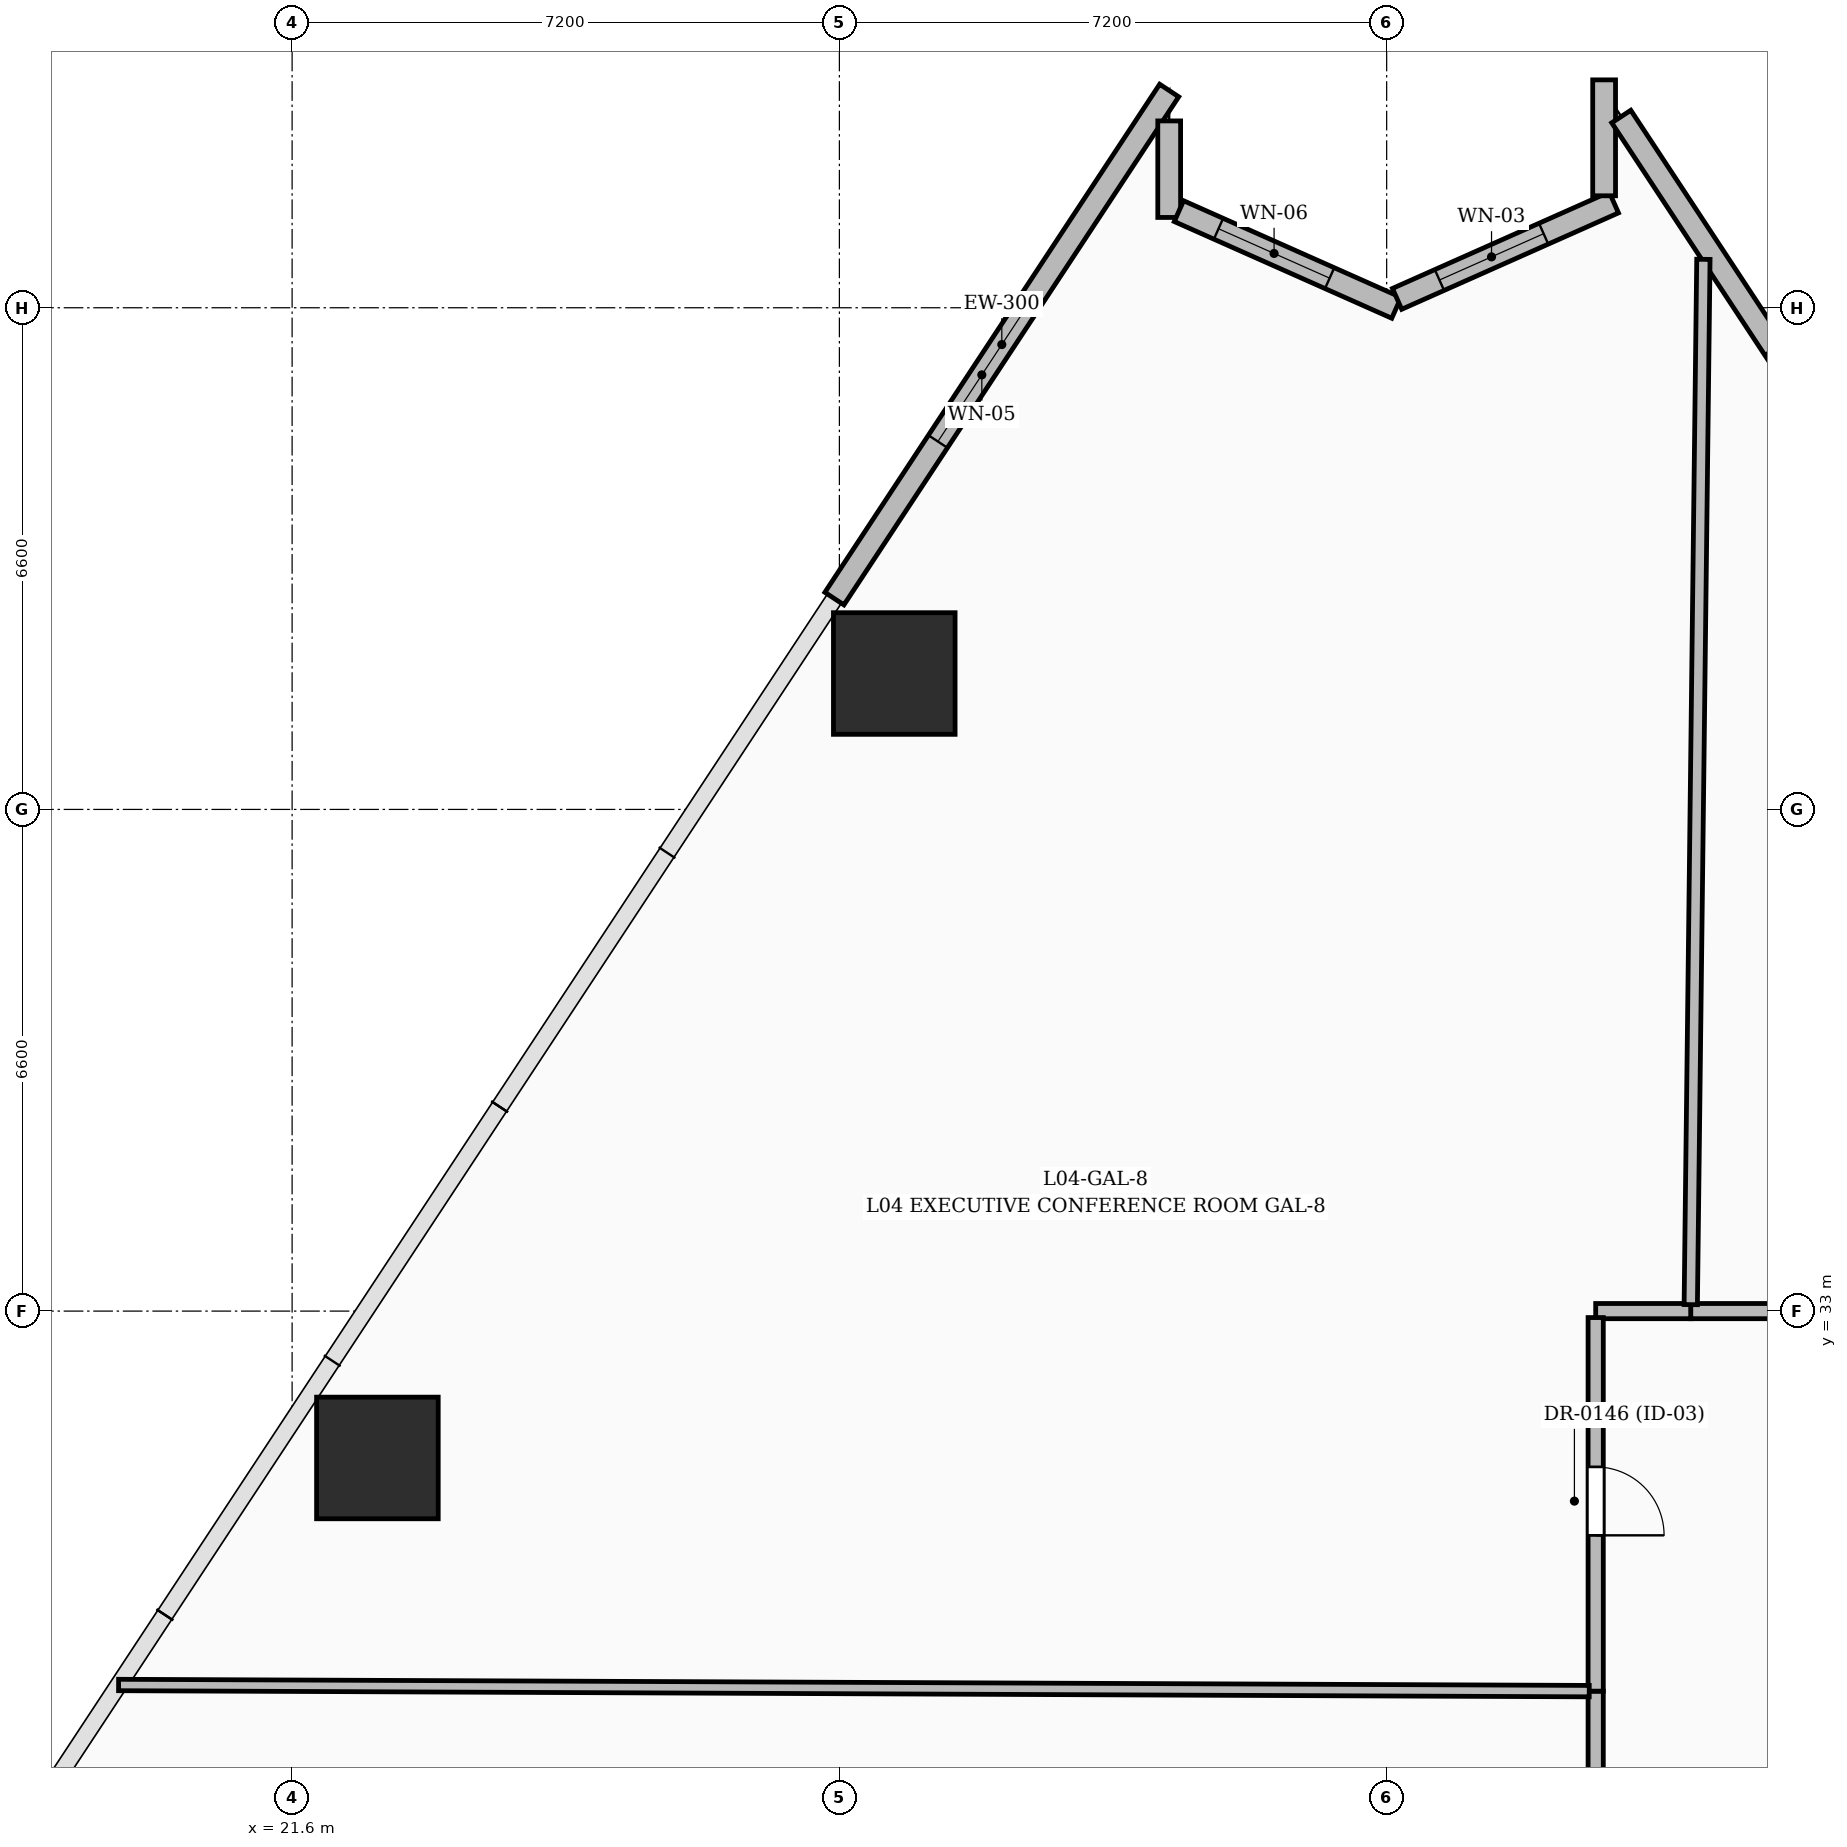
"""IFC4 building model, lengths in metres.
Left out: names, types, materials, properties, quantities, classifications, styles, units other than length and angle.
Written with IfcOpenShell. Run it as: python <this file> out.ifc"""

import sys

from ifc_helpers import new_model, si_unit, direction, frame, frame_2d, origin, origin_2d, place, context, subcontext, project, spatial, rectangle, extrude, element, fill, save


model = new_model("IFC4")
c1 = context("Model", 3, precision=1e-05, world=origin(), true_north=direction((0.0, 1.0)))
c2 = subcontext(c1, "Body", "Model", "MODEL_VIEW")
j1 = project(units=[si_unit("LENGTHUNIT", "METRE"), si_unit("PLANEANGLEUNIT", "RADIAN")], contexts=[c1])
p1 = place(None, origin())
s1 = spatial("IfcSite", under=j1, at=p1, CompositionType="ELEMENT")
p2 = place(p1, origin())
s2 = spatial("IfcBuilding", under=s1, at=p2, CompositionType="ELEMENT")
p3 = place(p2, frame((0.0, 0.0, 21.9)))
s3 = spatial("IfcBuildingStorey", under=s2, at=p3, CompositionType="ELEMENT", Elevation=21.9)
for number, where, z_axis, x_axis in (
    (1, (29.522, 41.388, 0.0), (0.0, 0.0, 1.0), (1.0, 0.0, 0.0)),
    (2, (22.722, 31.068, 0.0), (0.0, 0.0, 1.0), (1.0, 0.0, 0.0)),
):
    element("IfcColumn", number, at=place(p3, frame(where, z_axis=z_axis, x_axis=x_axis)), inside=s3, PredefinedType="COLUMN", context=c2, shape_type="SweptSolid", body=[
        extrude(rectangle(XDim=1.6, YDim=1.6, at=origin_2d()), origin(), (0.0, 0.0, 1.0), 4.5),
    ])
p4 = place(p3, frame((28.735, 42.374, 0.0), z_axis=(0.0, 0.0, 1.0), x_axis=(0.550187716895, 0.835041002693, 0.0)))
e3 = element("IfcWall", 3, at=p4, inside=s3, PredefinedType="SOLIDWALL", context=c2, shape_type="SweptSolid", body=[
    extrude(rectangle(XDim=8.005, YDim=0.3, at=frame_2d((4.002, 0.0))), origin(), (0.0, 0.0, 1.0), 4.2),
])
p5 = place(p4, frame((2.475, 0.0, 0.55)))
e4 = element("IfcOpeningElement", 4, at=p5, cuts=e3, PredefinedType="OPENING", context=c2, shape_type="SweptSolid", body=[
    extrude(rectangle(XDim=2.1, YDim=2.4, at=frame_2d((1.05, 1.2))), frame((0.0, 0.16, 0.0), z_axis=(0.0, -1.0, 0.0), x_axis=(1.0, 0.0, 0.0)), (0.0, 0.0, 1.0), 0.32),
])
p6 = place(p3, frame((33.139, 48.658, 0.0), z_axis=(0.0, 0.0, 1.0), x_axis=(0.0, -1.0, 0.0)))
e5 = element("IfcWall", 5, at=p6, inside=s3, PredefinedType="SOLIDWALL", context=c2, shape_type="SweptSolid", body=[
    extrude(rectangle(XDim=1.27, YDim=0.3, at=frame_2d((0.635, 0.0))), origin(), (0.0, 0.0, 1.0), 4.2),
])
p7 = place(p3, frame((33.267, 47.471, 0.0), z_axis=(0.0, 0.0, 1.0), x_axis=(0.913753658291, -0.40626869429, 0.0)))
e6 = element("IfcWall", 6, at=p7, inside=s3, PredefinedType="SOLIDWALL", context=c2, shape_type="SweptSolid", body=[
    extrude(rectangle(XDim=3.131, YDim=0.3, at=frame_2d((1.565, 0.0))), origin(), (0.0, 0.0, 1.0), 4.2),
])
p8 = place(p7, frame((0.57, 0.0, 0.55)))
e7 = element("IfcOpeningElement", 7, at=p8, cuts=e6, PredefinedType="OPENING", context=c2, shape_type="SweptSolid", body=[
    extrude(rectangle(XDim=1.6, YDim=2.2, at=frame_2d((0.8, 1.1))), frame((0.0, 0.16, 0.0), z_axis=(0.0, -1.0, 0.0), x_axis=(1.0, 0.0, 0.0)), (0.0, 0.0, 1.0), 0.32),
])
p9 = place(p3, frame((36.137, 46.317, 0.0), z_axis=(0.0, 0.0, 1.0), x_axis=(0.913740568099, 0.406298134638, 0.0)))
e8 = element("IfcWall", 8, at=p9, inside=s3, PredefinedType="SOLIDWALL", context=c2, shape_type="SweptSolid", body=[
    extrude(rectangle(XDim=3.121, YDim=0.3, at=frame_2d((1.561, 0.0))), origin(), (0.0, 0.0, 1.0), 4.2),
])
p10 = place(p9, frame((0.61, 0.0, 0.6)))
e9 = element("IfcOpeningElement", 9, at=p10, cuts=e8, PredefinedType="OPENING", context=c2, shape_type="SweptSolid", body=[
    extrude(rectangle(XDim=1.5, YDim=2.1, at=frame_2d((0.75, 1.05))), frame((0.0, 0.16, 0.0), z_axis=(0.0, -1.0, 0.0), x_axis=(1.0, 0.0, 0.0)), (0.0, 0.0, 1.0), 0.32),
])
p11 = place(p3, frame((38.861, 47.673, 0.0), z_axis=(0.0, 0.0, 1.0), x_axis=(0.0, 1.0, 0.0)))
e10 = element("IfcWall", 10, at=p11, inside=s3, PredefinedType="SOLIDWALL", context=c2, shape_type="SweptSolid", body=[
    extrude(rectangle(XDim=1.525, YDim=0.3, at=frame_2d((0.762, 0.0))), origin(), (0.0, 0.0, 1.0), 4.2),
])
p12 = place(p3, frame((39.087, 48.716, 0.0), z_axis=(0.0, 0.0, 1.0), x_axis=(0.55019380206, -0.835036993297, 0.0)))
e11 = element("IfcWall", 11, at=p12, inside=s3, PredefinedType="SOLIDWALL", context=c2, shape_type="SweptSolid", body=[
    extrude(rectangle(XDim=7.377, YDim=0.3, at=frame_2d((3.688, 0.0))), origin(), (0.0, 0.0, 1.0), 4.2),
])
p13 = place(p12, frame((3.65, 0.0, 0.6)))
e12 = element("IfcOpeningElement", 12, at=p13, cuts=e11, PredefinedType="OPENING", context=c2, shape_type="SweptSolid", body=[
    extrude(rectangle(XDim=2.4, YDim=2.1, at=frame_2d((1.2, 1.05))), frame((0.0, 0.16, 0.0), z_axis=(0.0, -1.0, 0.0), x_axis=(1.0, 0.0, 0.0)), (0.0, 0.0, 1.0), 0.32),
])
p14 = place(p3, frame((38.75, 28.0, 0.0), z_axis=(0.0, 0.0, 1.0), x_axis=(0.0, -1.0, 0.0)))
e13 = element("IfcWall", 13, at=p14, inside=s3, PredefinedType="PARTITIONING", context=c2, shape_type="SweptSolid", body=[
    extrude(rectangle(XDim=10.2, YDim=0.2, at=frame_2d((5.1, 0.0))), origin(), (0.0, 0.0, 1.0), 3.159),
])
p15 = place(p14, frame((4.65, 0.0, 0.0)))
e14 = element("IfcOpeningElement", 14, at=p15, cuts=e13, PredefinedType="OPENING", context=c2, shape_type="SweptSolid", body=[
    extrude(rectangle(XDim=0.9, YDim=2.1, at=frame_2d((0.45, 1.05))), frame((0.0, 0.11, 0.0), z_axis=(0.0, -1.0, 0.0), x_axis=(1.0, 0.0, 0.0)), (0.0, 0.0, 1.0), 0.22),
])
p16 = place(p3, frame((41.115, 33.0, 0.0), z_axis=(0.0, 0.0, 1.0), x_axis=(-1.0, 0.0, 0.0)))
e15 = element("IfcWall", 15, at=p16, inside=s3, PredefinedType="PARTITIONING", context=c2, shape_type="SweptSolid", body=[
    extrude(rectangle(XDim=1.115, YDim=0.2, at=frame_2d((0.558, 0.0))), origin(), (0.0, 0.0, 1.0), 4.2),
])
p17 = place(p3, frame((40.0, 33.0, 0.0), z_axis=(0.0, 0.0, 1.0), x_axis=(-1.0, 0.0, 0.0)))
e16 = element("IfcWall", 16, at=p17, inside=s3, PredefinedType="PARTITIONING", context=c2, shape_type="SweptSolid", body=[
    extrude(rectangle(XDim=1.25, YDim=0.2, at=frame_2d((0.625, 0.0))), origin(), (0.0, 0.0, 1.0), 4.2),
])
p18 = place(p3, frame((38.75, 32.915, 0.0), z_axis=(0.0, 0.0, 1.0), x_axis=(0.0, -1.0, 0.0)))
e17 = element("IfcWall", 17, at=p18, inside=s3, PredefinedType="PARTITIONING", context=c2, shape_type="SweptSolid", body=[
    extrude(rectangle(XDim=4.915, YDim=0.2, at=frame_2d((2.458, 0.0))), origin(), (0.0, 0.0, 1.0), 3.761),
])
p19 = place(p18, frame((1.965, 0.0, 0.0)))
e18 = element("IfcOpeningElement", 18, at=p19, cuts=e17, PredefinedType="OPENING", context=c2, shape_type="SweptSolid", body=[
    extrude(rectangle(XDim=0.9, YDim=2.1, at=frame_2d((0.45, 1.05))), frame((0.0, 0.11, 0.0), z_axis=(0.0, -1.0, 0.0), x_axis=(1.0, 0.0, 0.0)), (0.0, 0.0, 1.0), 0.22),
])
p20 = place(p3, frame((38.665, 28.0, 0.0), z_axis=(0.0, 0.0, 1.0), x_axis=(-0.999991330507, 0.004164001755, 0.0)))
e19 = element("IfcWall", 19, at=p20, inside=s3, PredefinedType="PARTITIONING", context=c2, shape_type="SweptSolid", body=[
    extrude(rectangle(XDim=19.348, YDim=0.15, at=frame_2d((9.674, 0.0))), origin(), (0.0, 0.0, 1.0), 1.97),
])
p21 = place(p3, frame((40.167, 46.837, 0.0), z_axis=(0.0, 0.0, 1.0), x_axis=(-0.012089018535, -0.999926925145, 0.0)))
e20 = element("IfcWall", 20, at=p21, inside=s3, PredefinedType="PARTITIONING", context=c2, shape_type="SweptSolid", body=[
    extrude(rectangle(XDim=13.753, YDim=0.175, at=frame_2d((6.876, 0.0))), origin(), (0.0, 0.0, 1.0), 2.97),
])
p22 = place(p5, origin())
e21 = element("IfcWindow", 21, at=p22, inside=s3, PartitioningType="SINGLE_PANEL", PredefinedType="WINDOW", context=c2, shape_type="SweptSolid", body=[
    extrude(rectangle(XDim=2.1, YDim=2.4, at=frame_2d((1.05, 1.2))), frame((0.0, 0.03, 0.0), z_axis=(0.0, -1.0, 0.0), x_axis=(1.0, 0.0, 0.0)), (0.0, 0.0, 1.0), 0.06),
])
fill(e4, e21)
p23 = place(p8, origin())
e22 = element("IfcWindow", 22, at=p23, inside=s3, PartitioningType="SINGLE_PANEL", PredefinedType="WINDOW", context=c2, shape_type="SweptSolid", body=[
    extrude(rectangle(XDim=1.6, YDim=2.2, at=frame_2d((0.8, 1.1))), frame((0.0, 0.03, 0.0), z_axis=(0.0, -1.0, 0.0), x_axis=(1.0, 0.0, 0.0)), (0.0, 0.0, 1.0), 0.06),
])
fill(e7, e22)
p24 = place(p10, origin())
e23 = element("IfcWindow", 23, at=p24, inside=s3, PartitioningType="SINGLE_PANEL", PredefinedType="WINDOW", context=c2, shape_type="SweptSolid", body=[
    extrude(rectangle(XDim=1.5, YDim=2.1, at=frame_2d((0.75, 1.05))), frame((0.0, 0.03, 0.0), z_axis=(0.0, -1.0, 0.0), x_axis=(1.0, 0.0, 0.0)), (0.0, 0.0, 1.0), 0.06),
])
fill(e9, e23)
p25 = place(p19, origin())
e24 = element("IfcDoor", 24, at=p25, inside=s3, OperationType="SINGLE_SWING_RIGHT", PredefinedType="DOOR", context=c2, shape_type="SweptSolid", body=[
    extrude(rectangle(XDim=0.9, YDim=2.1, at=frame_2d((0.45, 1.05))), frame((0.0, 0.025, 0.0), z_axis=(0.0, -1.0, 0.0), x_axis=(1.0, 0.0, 0.0)), (0.0, 0.0, 1.0), 0.05),
])
fill(e18, e24)
save(model, sys.argv[1])
